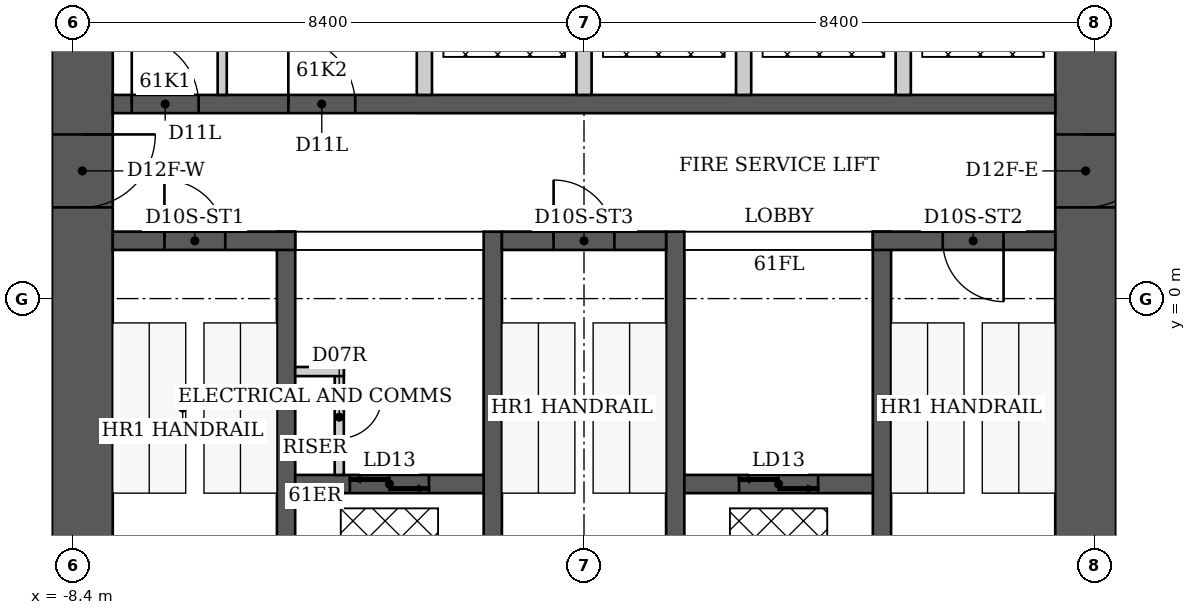
"""IFC4 building model, lengths in metres.
Left out: names, types, materials, properties, quantities, classifications, styles, units other than length and angle.
Written with IfcOpenShell. Run it as: python <this file> out.ifc"""

import sys

from ifc_helpers import new_model, si_unit, direction, frame, frame_2d, origin, place, context, subcontext, project, spatial, rectangle, extrude, element, fill, save


model = new_model("IFC4")
c1 = context("Model", 3, precision=1e-05, world=origin(), true_north=direction((0.0, 1.0)))
c2 = subcontext(c1, "Body", "Model", "MODEL_VIEW")
j1 = project(units=[si_unit("LENGTHUNIT", "METRE"), si_unit("PLANEANGLEUNIT", "RADIAN")], contexts=[c1])
p1 = place(None, origin())
s1 = spatial("IfcSite", under=j1, at=p1, CompositionType="ELEMENT")
p2 = place(p1, origin())
s2 = spatial("IfcBuilding", under=s1, at=p2, CompositionType="ELEMENT")
p3 = place(p2, frame((0.0, 0.0, 244.0)))
s3 = spatial("IfcBuildingStorey", under=s2, at=p3, CompositionType="ELEMENT", Elevation=244.0)
p4 = place(p3, frame((-8.25, -6.1, 0.0), z_axis=(0.0, 0.0, 1.0), x_axis=(0.0, 1.0, 0.0)))
e1 = element("IfcWall", 1, at=p4, inside=s3, PredefinedType="SHEAR", context=c2, shape_type="SweptSolid", body=[
    extrude(rectangle(XDim=12.2, YDim=1.0, at=frame_2d((6.1, 0.0))), origin(), (0.0, 0.0, 1.0), 3.8),
])
p5 = place(p4, frame((7.6, 0.0, 0.0)))
e2 = element("IfcOpeningElement", 2, at=p5, cuts=e1, PredefinedType="OPENING", context=c2, shape_type="SweptSolid", body=[
    extrude(rectangle(XDim=1.2, YDim=2.2, at=frame_2d((0.6, 1.1))), frame((0.0, 0.5, 0.0), z_axis=(0.0, -1.0, 0.0), x_axis=(1.0, 0.0, 0.0)), (0.0, 0.0, 1.0), 1.0),
])
p6 = place(p3, frame((8.25, -6.1, 0.0), z_axis=(0.0, 0.0, 1.0), x_axis=(0.0, 1.0, 0.0)))
e3 = element("IfcWall", 3, at=p6, inside=s3, PredefinedType="SHEAR", context=c2, shape_type="SweptSolid", body=[
    extrude(rectangle(XDim=12.2, YDim=1.0, at=frame_2d((6.1, 0.0))), origin(), (0.0, 0.0, 1.0), 3.8),
])
p7 = place(p6, frame((7.6, 0.0, 0.0)))
e4 = element("IfcOpeningElement", 4, at=p7, cuts=e3, PredefinedType="OPENING", context=c2, shape_type="SweptSolid", body=[
    extrude(rectangle(XDim=1.2, YDim=2.2, at=frame_2d((0.6, 1.1))), frame((0.0, 0.5, 0.0), z_axis=(0.0, -1.0, 0.0), x_axis=(1.0, 0.0, 0.0)), (0.0, 0.0, 1.0), 1.0),
])
for number, where, z_axis, x_axis in (
    (5, (-4.9, -6.1, 0.0), (0.0, 0.0, 1.0), (0.0, 1.0, 0.0)),
    (6, (-1.5, -6.1, 0.0), (0.0, 0.0, 1.0), (0.0, 1.0, 0.0)),
    (7, (1.5, -6.1, 0.0), (0.0, 0.0, 1.0), (0.0, 1.0, 0.0)),
    (8, (4.9, -6.1, 0.0), (0.0, 0.0, 1.0), (0.0, 1.0, 0.0)),
):
    element("IfcWall", number, at=place(p3, frame(where, z_axis=z_axis, x_axis=x_axis)), inside=s3, PredefinedType="SHEAR", context=c2, shape_type="SweptSolid", body=[
        extrude(rectangle(XDim=7.2, YDim=0.3, at=frame_2d((3.6, 0.0))), origin(), (0.0, 0.0, 1.0), 3.8),
    ])
p8 = place(p3, frame((-7.75, 0.95, 0.0), z_axis=(0.0, 0.0, 1.0), x_axis=(1.0, 0.0, 0.0)))
e9 = element("IfcWall", 9, at=p8, inside=s3, PredefinedType="SHEAR", context=c2, shape_type="SweptSolid", body=[
    extrude(rectangle(XDim=3.0, YDim=0.3, at=frame_2d((1.5, 0.0))), origin(), (0.0, 0.0, 1.0), 3.8),
])
p9 = place(p8, frame((0.85, 0.0, 0.0)))
e10 = element("IfcOpeningElement", 10, at=p9, cuts=e9, PredefinedType="OPENING", context=c2, shape_type="SweptSolid", body=[
    extrude(rectangle(XDim=1.0, YDim=2.2, at=frame_2d((0.5, 1.1))), frame((0.0, 0.15, 0.0), z_axis=(0.0, -1.0, 0.0), x_axis=(1.0, 0.0, 0.0)), (0.0, 0.0, 1.0), 0.3),
])
p10 = place(p3, frame((-1.35, 0.95, 0.0), z_axis=(0.0, 0.0, 1.0), x_axis=(1.0, 0.0, 0.0)))
e11 = element("IfcWall", 11, at=p10, inside=s3, PredefinedType="SHEAR", context=c2, shape_type="SweptSolid", body=[
    extrude(rectangle(XDim=2.7, YDim=0.3, at=frame_2d((1.35, 0.0))), origin(), (0.0, 0.0, 1.0), 3.8),
])
p11 = place(p10, frame((0.85, 0.0, 0.0)))
e12 = element("IfcOpeningElement", 12, at=p11, cuts=e11, PredefinedType="OPENING", context=c2, shape_type="SweptSolid", body=[
    extrude(rectangle(XDim=1.0, YDim=2.2, at=frame_2d((0.5, 1.1))), frame((0.0, 0.15, 0.0), z_axis=(0.0, -1.0, 0.0), x_axis=(1.0, 0.0, 0.0)), (0.0, 0.0, 1.0), 0.3),
])
p12 = place(p3, frame((4.75, 0.95, 0.0), z_axis=(0.0, 0.0, 1.0), x_axis=(1.0, 0.0, 0.0)))
e13 = element("IfcWall", 13, at=p12, inside=s3, PredefinedType="SHEAR", context=c2, shape_type="SweptSolid", body=[
    extrude(rectangle(XDim=3.0, YDim=0.3, at=frame_2d((1.5, 0.0))), origin(), (0.0, 0.0, 1.0), 3.8),
])
p13 = place(p12, frame((1.15, 0.0, 0.0)))
e14 = element("IfcOpeningElement", 14, at=p13, cuts=e13, PredefinedType="OPENING", context=c2, shape_type="SweptSolid", body=[
    extrude(rectangle(XDim=1.0, YDim=2.2, at=frame_2d((0.5, 1.1))), frame((0.0, 0.15, 0.0), z_axis=(0.0, -1.0, 0.0), x_axis=(1.0, 0.0, 0.0)), (0.0, 0.0, 1.0), 0.3),
])
p14 = place(p3, frame((-4.75, -3.05, 0.0), z_axis=(0.0, 0.0, 1.0), x_axis=(1.0, 0.0, 0.0)))
e15 = element("IfcWall", 15, at=p14, inside=s3, PredefinedType="SHEAR", context=c2, shape_type="SweptSolid", body=[
    extrude(rectangle(XDim=3.1, YDim=0.3, at=frame_2d((1.55, 0.0))), origin(), (0.0, 0.0, 1.0), 3.8),
])
p15 = place(p14, frame((0.9, 0.0, 0.0)))
e16 = element("IfcOpeningElement", 16, at=p15, cuts=e15, PredefinedType="OPENING", context=c2, shape_type="SweptSolid", body=[
    extrude(rectangle(XDim=1.3, YDim=2.1, at=frame_2d((0.65, 1.05))), frame((0.0, 0.15, 0.0), z_axis=(0.0, -1.0, 0.0), x_axis=(1.0, 0.0, 0.0)), (0.0, 0.0, 1.0), 0.3),
])
p16 = place(p3, frame((1.65, -3.05, 0.0), z_axis=(0.0, 0.0, 1.0), x_axis=(1.0, 0.0, 0.0)))
e17 = element("IfcWall", 17, at=p16, inside=s3, PredefinedType="SHEAR", context=c2, shape_type="SweptSolid", body=[
    extrude(rectangle(XDim=3.1, YDim=0.3, at=frame_2d((1.55, 0.0))), origin(), (0.0, 0.0, 1.0), 3.8),
])
p17 = place(p16, frame((0.9, 0.0, 0.0)))
e18 = element("IfcOpeningElement", 18, at=p17, cuts=e17, PredefinedType="OPENING", context=c2, shape_type="SweptSolid", body=[
    extrude(rectangle(XDim=1.3, YDim=2.1, at=frame_2d((0.65, 1.05))), frame((0.0, 0.15, 0.0), z_axis=(0.0, -1.0, 0.0), x_axis=(1.0, 0.0, 0.0)), (0.0, 0.0, 1.0), 0.3),
])
p18 = place(p3, frame((-7.75, 3.2, 0.0), z_axis=(0.0, 0.0, 1.0), x_axis=(1.0, 0.0, 0.0)))
e19 = element("IfcWall", 19, at=p18, inside=s3, PredefinedType="SHEAR", context=c2, shape_type="SweptSolid", body=[
    extrude(rectangle(XDim=15.5, YDim=0.3, at=frame_2d((7.75, 0.0))), origin(), (0.0, 0.0, 1.0), 3.8),
])
p19 = place(p18, frame((0.312, 0.0, 0.0)))
e20 = element("IfcOpeningElement", 20, at=p19, cuts=e19, PredefinedType="OPENING", context=c2, shape_type="SweptSolid", body=[
    extrude(rectangle(XDim=1.1, YDim=2.2, at=frame_2d((0.55, 1.1))), frame((0.0, 0.15, 0.0), z_axis=(0.0, -1.0, 0.0), x_axis=(1.0, 0.0, 0.0)), (0.0, 0.0, 1.0), 0.3),
])
p20 = place(p18, frame((2.887, 0.0, 0.0)))
e21 = element("IfcOpeningElement", 21, at=p20, cuts=e19, PredefinedType="OPENING", context=c2, shape_type="SweptSolid", body=[
    extrude(rectangle(XDim=1.1, YDim=2.2, at=frame_2d((0.55, 1.1))), frame((0.0, 0.15, 0.0), z_axis=(0.0, -1.0, 0.0), x_axis=(1.0, 0.0, 0.0)), (0.0, 0.0, 1.0), 0.3),
])
for number, where, z_axis, x_axis in (
    (22, (-2.625, 3.35, 0.0), (0.0, 0.0, 1.0), (0.0, 1.0, 0.0)),
    (23, (0.0, 3.35, 0.0), (0.0, 0.0, 1.0), (0.0, 1.0, 0.0)),
    (24, (2.625, 3.35, 0.0), (0.0, 0.0, 1.0), (0.0, 1.0, 0.0)),
    (25, (5.25, 3.35, 0.0), (0.0, 0.0, 1.0), (0.0, 1.0, 0.0)),
):
    element("IfcWall", number, at=place(p3, frame(where, z_axis=z_axis, x_axis=x_axis)), inside=s3, PredefinedType="PARTITIONING", context=c2, shape_type="SweptSolid", body=[
        extrude(rectangle(XDim=2.75, YDim=0.25, at=frame_2d((1.375, 0.0))), origin(), (0.0, 0.0, 1.0), 3.8),
    ])
p21 = place(p3, frame((-4.025, -2.9, 0.0), z_axis=(0.0, 0.0, 1.0), x_axis=(0.0, 1.0, 0.0)))
e26 = element("IfcWall", 26, at=p21, inside=s3, PredefinedType="PARTITIONING", context=c2, shape_type="SweptSolid", body=[
    extrude(rectangle(XDim=1.775, YDim=0.15, at=frame_2d((0.887, 0.0))), origin(), (0.0, 0.0, 1.0), 3.64),
])
p22 = place(p21, frame((0.6, 0.0, 0.0)))
e27 = element("IfcOpeningElement", 27, at=p22, cuts=e26, PredefinedType="OPENING", context=c2, shape_type="SweptSolid", body=[
    extrude(rectangle(XDim=0.7, YDim=2.1, at=frame_2d((0.35, 1.05))), frame((0.0, 0.075, 0.0), z_axis=(0.0, -1.0, 0.0), x_axis=(1.0, 0.0, 0.0)), (0.0, 0.0, 1.0), 0.15),
])
p23 = place(p3, frame((-4.75, -1.2, 0.0), z_axis=(0.0, 0.0, 1.0), x_axis=(1.0, 0.0, 0.0)))
e28 = element("IfcWall", 28, at=p23, inside=s3, PredefinedType="PARTITIONING", context=c2, shape_type="SweptSolid", body=[
    extrude(rectangle(XDim=0.8, YDim=0.15, at=frame_2d((0.4, 0.0))), origin(), (0.0, 0.0, 1.0), 3.64),
])
p24 = place(p3, frame((-5.95, 3.35, 0.0), z_axis=(0.0, 0.0, 1.0), x_axis=(0.0, 1.0, 0.0)))
e29 = element("IfcWall", 29, at=p24, inside=s3, PredefinedType="PARTITIONING", context=c2, shape_type="SweptSolid", body=[
    extrude(rectangle(XDim=2.75, YDim=0.15, at=frame_2d((1.375, 0.0))), origin(), (0.0, 0.0, 1.0), 3.64),
])
p25 = place(p9, origin())
e30 = element("IfcDoor", 30, at=p25, inside=s3, OperationType="SINGLE_SWING_LEFT", PredefinedType="DOOR", context=c2, shape_type="SweptSolid", body=[
    extrude(rectangle(XDim=1.0, YDim=2.2, at=frame_2d((0.5, 1.1))), frame((0.0, 0.025, 0.0), z_axis=(0.0, -1.0, 0.0), x_axis=(1.0, 0.0, 0.0)), (0.0, 0.0, 1.0), 0.05),
])
fill(e10, e30)
p26 = place(p11, origin())
e31 = element("IfcDoor", 31, at=p26, inside=s3, OperationType="SINGLE_SWING_LEFT", PredefinedType="DOOR", context=c2, shape_type="SweptSolid", body=[
    extrude(rectangle(XDim=1.0, YDim=2.2, at=frame_2d((0.5, 1.1))), frame((0.0, 0.025, 0.0), z_axis=(0.0, -1.0, 0.0), x_axis=(1.0, 0.0, 0.0)), (0.0, 0.0, 1.0), 0.05),
])
fill(e12, e31)
p27 = place(p13, origin())
e32 = element("IfcDoor", 32, at=p27, inside=s3, OperationType="SINGLE_SWING_RIGHT", PredefinedType="DOOR", context=c2, shape_type="SweptSolid", body=[
    extrude(rectangle(XDim=1.0, YDim=2.2, at=frame_2d((0.5, 1.1))), frame((0.0, 0.025, 0.0), z_axis=(0.0, -1.0, 0.0), x_axis=(1.0, 0.0, 0.0)), (0.0, 0.0, 1.0), 0.05),
])
fill(e14, e32)
p28 = place(p5, origin())
e33 = element("IfcDoor", 33, at=p28, inside=s3, OperationType="SINGLE_SWING_RIGHT", PredefinedType="DOOR", context=c2, shape_type="SweptSolid", body=[
    extrude(rectangle(XDim=1.2, YDim=2.2, at=frame_2d((0.6, 1.1))), frame((0.0, 0.025, 0.0), z_axis=(0.0, -1.0, 0.0), x_axis=(1.0, 0.0, 0.0)), (0.0, 0.0, 1.0), 0.05),
])
fill(e2, e33)
p29 = place(p7, origin())
e34 = element("IfcDoor", 34, at=p29, inside=s3, OperationType="SINGLE_SWING_RIGHT", PredefinedType="DOOR", context=c2, shape_type="SweptSolid", body=[
    extrude(rectangle(XDim=1.2, YDim=2.2, at=frame_2d((0.6, 1.1))), frame((0.0, 0.025, 0.0), z_axis=(0.0, -1.0, 0.0), x_axis=(1.0, 0.0, 0.0)), (0.0, 0.0, 1.0), 0.05),
])
fill(e4, e34)
p30 = place(p22, origin())
e35 = element("IfcDoor", 35, at=p30, inside=s3, OperationType="SINGLE_SWING_RIGHT", PredefinedType="DOOR", context=c2, shape_type="SweptSolid", body=[
    extrude(rectangle(XDim=0.7, YDim=2.1, at=frame_2d((0.35, 1.05))), frame((0.0, 0.025, 0.0), z_axis=(0.0, -1.0, 0.0), x_axis=(1.0, 0.0, 0.0)), (0.0, 0.0, 1.0), 0.05),
])
fill(e27, e35)
p31 = place(p19, origin())
e36 = element("IfcDoor", 36, at=p31, inside=s3, OperationType="SINGLE_SWING_LEFT", PredefinedType="DOOR", context=c2, shape_type="SweptSolid", body=[
    extrude(rectangle(XDim=1.1, YDim=2.2, at=frame_2d((0.55, 1.1))), frame((0.0, 0.025, 0.0), z_axis=(0.0, -1.0, 0.0), x_axis=(1.0, 0.0, 0.0)), (0.0, 0.0, 1.0), 0.05),
])
fill(e20, e36)
p32 = place(p20, origin())
e37 = element("IfcDoor", 37, at=p32, inside=s3, OperationType="SINGLE_SWING_LEFT", PredefinedType="DOOR", context=c2, shape_type="SweptSolid", body=[
    extrude(rectangle(XDim=1.1, YDim=2.2, at=frame_2d((0.55, 1.1))), frame((0.0, 0.025, 0.0), z_axis=(0.0, -1.0, 0.0), x_axis=(1.0, 0.0, 0.0)), (0.0, 0.0, 1.0), 0.05),
])
fill(e21, e37)
p33 = place(p15, origin())
e38 = element("IfcDoor", 38, at=p33, inside=s3, OperationType="DOUBLE_DOOR_SLIDING", PredefinedType="DOOR", context=c2, shape_type="SweptSolid", body=[
    extrude(rectangle(XDim=1.3, YDim=2.1, at=frame_2d((0.65, 1.05))), frame((0.0, 0.025, 0.0), z_axis=(0.0, -1.0, 0.0), x_axis=(1.0, 0.0, 0.0)), (0.0, 0.0, 1.0), 0.05),
])
fill(e16, e38)
p34 = place(p17, origin())
e39 = element("IfcDoor", 39, at=p34, inside=s3, OperationType="DOUBLE_DOOR_SLIDING", PredefinedType="DOOR", context=c2, shape_type="SweptSolid", body=[
    extrude(rectangle(XDim=1.3, YDim=2.1, at=frame_2d((0.65, 1.05))), frame((0.0, 0.025, 0.0), z_axis=(0.0, -1.0, 0.0), x_axis=(1.0, 0.0, 0.0)), (0.0, 0.0, 1.0), 0.05),
])
fill(e18, e39)
save(model, sys.argv[1])
